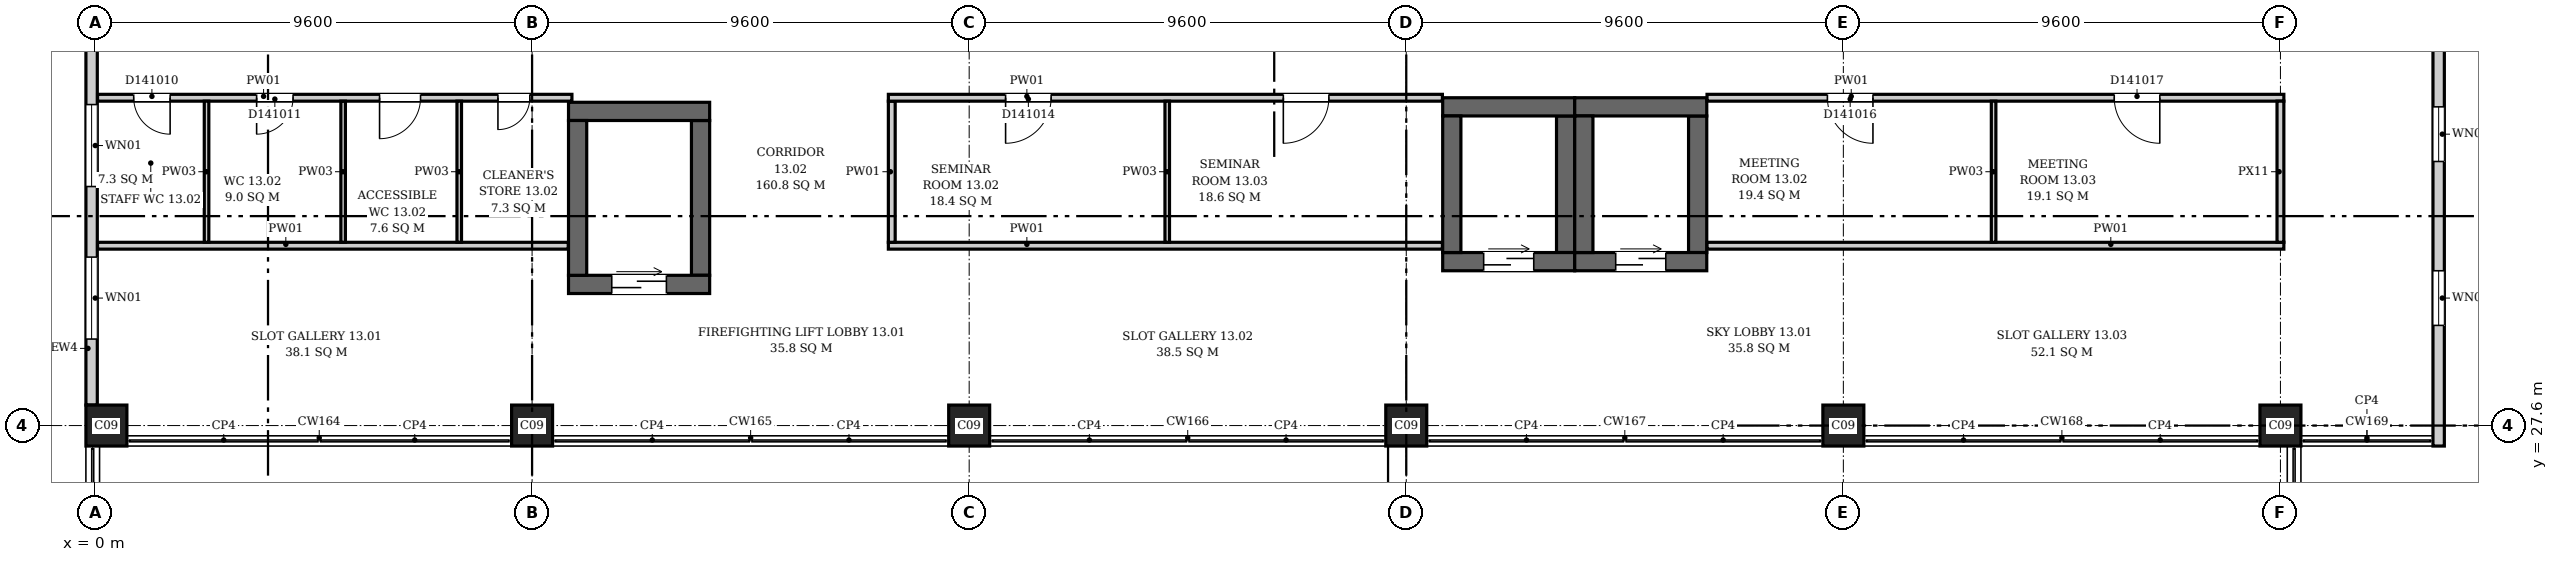
"""IFC4 building model, lengths in metres.
Left out: names, types, materials, properties, quantities, classifications, styles, units other than length and angle.
Written with IfcOpenShell. Run it as: python <this file> out.ifc"""

import sys

from ifc_helpers import new_model, si_unit, direction, frame, frame_2d, origin, origin_2d, place, context, subcontext, project, spatial, rectangle, extrude, element, fill, save


model = new_model("IFC4")
c1 = context("Model", 3, precision=1e-05, world=origin(), true_north=direction((0.0, 1.0)))
c2 = subcontext(c1, "Body", "Model", "MODEL_VIEW")
j1 = project(units=[si_unit("LENGTHUNIT", "METRE"), si_unit("PLANEANGLEUNIT", "RADIAN")], contexts=[c1])
p1 = place(None, origin())
s1 = spatial("IfcSite", under=j1, at=p1, CompositionType="ELEMENT")
p2 = place(p1, origin())
s2 = spatial("IfcBuilding", under=s1, at=p2, CompositionType="ELEMENT")
p3 = place(p2, frame((0.0, 0.0, 65.5)))
s3 = spatial("IfcBuildingStorey", under=s2, at=p3, CompositionType="ELEMENT", Elevation=65.5)
p4 = place(p3, frame((10.4, 30.7, 0.0), z_axis=(0.0, 0.0, 1.0), x_axis=(1.0, 0.0, 0.0)))
e1 = element("IfcWall", 1, at=p4, inside=s3, PredefinedType="SHEAR", context=c2, shape_type="SweptSolid", body=[
    extrude(rectangle(XDim=3.1, YDim=0.4, at=frame_2d((1.55, 0.0))), origin(), (0.0, 0.0, 1.0), 4.2),
])
p5 = place(p4, frame((0.95, 0.0, 0.0)))
e2 = element("IfcOpeningElement", 2, at=p5, cuts=e1, PredefinedType="OPENING", context=c2, shape_type="SweptSolid", body=[
    extrude(rectangle(XDim=1.2, YDim=2.1, at=frame_2d((0.6, 1.05))), frame((0.0, 0.21, 0.0), z_axis=(0.0, -1.0, 0.0), x_axis=(1.0, 0.0, 0.0)), (0.0, 0.0, 1.0), 0.42),
])
p6 = place(p3, frame((10.4, 34.5, 0.0), z_axis=(0.0, 0.0, 1.0), x_axis=(1.0, 0.0, 0.0)))
e3 = element("IfcWall", 3, at=p6, inside=s3, PredefinedType="SHEAR", context=c2, shape_type="SweptSolid", body=[
    extrude(rectangle(XDim=3.1, YDim=0.4, at=frame_2d((1.55, 0.0))), origin(), (0.0, 0.0, 1.0), 4.2),
])
for number, where, z_axis, x_axis in (
    (4, (10.6, 30.9, 0.0), (0.0, 0.0, 1.0), (0.0, 1.0, 0.0)),
    (5, (13.3, 30.9, 0.0), (0.0, 0.0, 1.0), (0.0, 1.0, 0.0)),
):
    element("IfcWall", number, at=place(p3, frame(where, z_axis=z_axis, x_axis=x_axis)), inside=s3, PredefinedType="SHEAR", context=c2, shape_type="SweptSolid", body=[
        extrude(rectangle(XDim=3.4, YDim=0.4, at=frame_2d((1.7, 0.0))), origin(), (0.0, 0.0, 1.0), 4.2),
    ])
p7 = place(p3, frame((29.6, 31.2, 0.0), z_axis=(0.0, 0.0, 1.0), x_axis=(1.0, 0.0, 0.0)))
e6 = element("IfcWall", 6, at=p7, inside=s3, PredefinedType="SHEAR", context=c2, shape_type="SweptSolid", body=[
    extrude(rectangle(XDim=2.9, YDim=0.4, at=frame_2d((1.45, 0.0))), origin(), (0.0, 0.0, 1.0), 4.2),
])
p8 = place(p7, frame((0.9, 0.0, 0.0)))
e7 = element("IfcOpeningElement", 7, at=p8, cuts=e6, PredefinedType="OPENING", context=c2, shape_type="SweptSolid", body=[
    extrude(rectangle(XDim=1.1, YDim=2.1, at=frame_2d((0.55, 1.05))), frame((0.0, 0.21, 0.0), z_axis=(0.0, -1.0, 0.0), x_axis=(1.0, 0.0, 0.0)), (0.0, 0.0, 1.0), 0.42),
])
p9 = place(p3, frame((29.6, 34.6, 0.0), z_axis=(0.0, 0.0, 1.0), x_axis=(1.0, 0.0, 0.0)))
e8 = element("IfcWall", 8, at=p9, inside=s3, PredefinedType="SHEAR", context=c2, shape_type="SweptSolid", body=[
    extrude(rectangle(XDim=2.9, YDim=0.4, at=frame_2d((1.45, 0.0))), origin(), (0.0, 0.0, 1.0), 4.2),
])
for number, where, z_axis, x_axis in (
    (9, (29.8, 31.4, 0.0), (0.0, 0.0, 1.0), (0.0, 1.0, 0.0)),
    (10, (32.3, 31.4, 0.0), (0.0, 0.0, 1.0), (0.0, 1.0, 0.0)),
):
    element("IfcWall", number, at=place(p3, frame(where, z_axis=z_axis, x_axis=x_axis)), inside=s3, PredefinedType="SHEAR", context=c2, shape_type="SweptSolid", body=[
        extrude(rectangle(XDim=3.0, YDim=0.4, at=frame_2d((1.5, 0.0))), origin(), (0.0, 0.0, 1.0), 4.2),
    ])
p10 = place(p3, frame((32.5, 31.2, 0.0), z_axis=(0.0, 0.0, 1.0), x_axis=(1.0, 0.0, 0.0)))
e11 = element("IfcWall", 11, at=p10, inside=s3, PredefinedType="SHEAR", context=c2, shape_type="SweptSolid", body=[
    extrude(rectangle(XDim=2.9, YDim=0.4, at=frame_2d((1.45, 0.0))), origin(), (0.0, 0.0, 1.0), 4.2),
])
p11 = place(p10, frame((0.9, 0.0, 0.0)))
e12 = element("IfcOpeningElement", 12, at=p11, cuts=e11, PredefinedType="OPENING", context=c2, shape_type="SweptSolid", body=[
    extrude(rectangle(XDim=1.1, YDim=2.1, at=frame_2d((0.55, 1.05))), frame((0.0, 0.21, 0.0), z_axis=(0.0, -1.0, 0.0), x_axis=(1.0, 0.0, 0.0)), (0.0, 0.0, 1.0), 0.42),
])
p12 = place(p3, frame((32.5, 34.6, 0.0), z_axis=(0.0, 0.0, 1.0), x_axis=(1.0, 0.0, 0.0)))
e13 = element("IfcWall", 13, at=p12, inside=s3, PredefinedType="SHEAR", context=c2, shape_type="SweptSolid", body=[
    extrude(rectangle(XDim=2.9, YDim=0.4, at=frame_2d((1.45, 0.0))), origin(), (0.0, 0.0, 1.0), 4.2),
])
for number, where, z_axis, x_axis in (
    (14, (32.7, 31.4, 0.0), (0.0, 0.0, 1.0), (0.0, 1.0, 0.0)),
    (15, (35.2, 31.4, 0.0), (0.0, 0.0, 1.0), (0.0, 1.0, 0.0)),
):
    element("IfcWall", number, at=place(p3, frame(where, z_axis=z_axis, x_axis=x_axis)), inside=s3, PredefinedType="SHEAR", context=c2, shape_type="SweptSolid", body=[
        extrude(rectangle(XDim=3.0, YDim=0.4, at=frame_2d((1.5, 0.0))), origin(), (0.0, 0.0, 1.0), 4.2),
    ])
for number, where, z_axis, x_axis in (
    (16, (0.25, 27.6, 0.0), (0.0, 0.0, 1.0), (1.0, 0.0, 0.0)),
    (17, (9.6, 27.6, 0.0), (0.0, 0.0, 1.0), (1.0, 0.0, 0.0)),
    (18, (19.2, 27.6, 0.0), (0.0, 0.0, 1.0), (1.0, 0.0, 0.0)),
    (19, (28.8, 27.6, 0.0), (0.0, 0.0, 1.0), (1.0, 0.0, 0.0)),
    (20, (38.4, 27.6, 0.0), (0.0, 0.0, 1.0), (1.0, 0.0, 0.0)),
    (21, (48.0, 27.6, 0.0), (0.0, 0.0, 1.0), (1.0, 0.0, 0.0)),
):
    element("IfcColumn", number, at=place(p3, frame(where, z_axis=z_axis, x_axis=x_axis)), inside=s3, PredefinedType="COLUMN", context=c2, shape_type="SweptSolid", body=[
        extrude(rectangle(XDim=0.9, YDim=0.9, at=origin_2d()), origin(), (0.0, 0.0, 1.0), 4.2),
    ])
p13 = place(p3, frame((-0.074, 36.35, 0.0), z_axis=(0.0, 0.0, 1.0), x_axis=(0.0, -1.0, 0.0)))
e22 = element("IfcWall", 22, at=p13, inside=s3, PredefinedType="ELEMENTEDWALL", context=c2, shape_type="SweptSolid", body=[
    extrude(rectangle(XDim=8.3, YDim=0.25, at=frame_2d((4.15, 0.0))), origin(), (0.0, 0.0, 1.0), 3.9),
])
p14 = place(p13, frame((5.05, 0.0, 0.9)))
e23 = element("IfcOpeningElement", 23, at=p14, cuts=e22, PredefinedType="OPENING", context=c2, shape_type="SweptSolid", body=[
    extrude(rectangle(XDim=1.8, YDim=2.6, at=frame_2d((0.9, 1.3))), frame((0.0, 0.135, 0.0), z_axis=(0.0, -1.0, 0.0), x_axis=(1.0, 0.0, 0.0)), (0.0, 0.0, 1.0), 0.27),
])
p15 = place(p13, frame((1.7, 0.0, 0.9)))
e24 = element("IfcOpeningElement", 24, at=p15, cuts=e22, PredefinedType="OPENING", context=c2, shape_type="SweptSolid", body=[
    extrude(rectangle(XDim=1.8, YDim=2.6, at=frame_2d((0.9, 1.3))), frame((0.0, 0.135, 0.0), z_axis=(0.0, -1.0, 0.0), x_axis=(1.0, 0.0, 0.0)), (0.0, 0.0, 1.0), 0.27),
])
p16 = place(p3, frame((51.475, 27.15, 0.0), z_axis=(0.0, 0.0, 1.0), x_axis=(0.0, 1.0, 0.0)))
e25 = element("IfcWall", 25, at=p16, inside=s3, PredefinedType="ELEMENTEDWALL", context=c2, shape_type="SweptSolid", body=[
    extrude(rectangle(XDim=19.3, YDim=0.25, at=frame_2d((9.65, 0.0))), origin(), (0.0, 0.0, 1.0), 3.9),
])
p17 = place(p16, frame((2.65, 0.0, 0.6)))
e26 = element("IfcOpeningElement", 26, at=p17, cuts=e25, PredefinedType="OPENING", context=c2, shape_type="SweptSolid", body=[
    extrude(rectangle(XDim=1.2, YDim=2.5, at=frame_2d((0.6, 1.25))), frame((0.0, 0.135, 0.0), z_axis=(0.0, -1.0, 0.0), x_axis=(1.0, 0.0, 0.0)), (0.0, 0.0, 1.0), 0.27),
])
p18 = place(p16, frame((6.25, 0.0, 0.6)))
e27 = element("IfcOpeningElement", 27, at=p18, cuts=e25, PredefinedType="OPENING", context=c2, shape_type="SweptSolid", body=[
    extrude(rectangle(XDim=1.2, YDim=2.5, at=frame_2d((0.6, 1.25))), frame((0.0, 0.135, 0.0), z_axis=(0.0, -1.0, 0.0), x_axis=(1.0, 0.0, 0.0)), (0.0, 0.0, 1.0), 0.27),
])
p19 = place(p16, frame((11.85, 0.0, 0.6)))
e28 = element("IfcOpeningElement", 28, at=p19, cuts=e25, PredefinedType="OPENING", context=c2, shape_type="SweptSolid", body=[
    extrude(rectangle(XDim=1.2, YDim=2.5, at=frame_2d((0.6, 1.25))), frame((0.0, 0.135, 0.0), z_axis=(0.0, -1.0, 0.0), x_axis=(1.0, 0.0, 0.0)), (0.0, 0.0, 1.0), 0.27),
])
p20 = place(p16, frame((15.45, 0.0, 0.6)))
e29 = element("IfcOpeningElement", 29, at=p20, cuts=e25, PredefinedType="OPENING", context=c2, shape_type="SweptSolid", body=[
    extrude(rectangle(XDim=1.2, YDim=2.5, at=frame_2d((0.6, 1.25))), frame((0.0, 0.135, 0.0), z_axis=(0.0, -1.0, 0.0), x_axis=(1.0, 0.0, 0.0)), (0.0, 0.0, 1.0), 0.27),
])
p21 = place(p3, frame((0.056, 31.55, 0.0), z_axis=(0.0, 0.0, 1.0), x_axis=(1.0, 0.0, 0.0)))
e30 = element("IfcWall", 30, at=p21, inside=s3, PredefinedType="PARTITIONING", context=c2, shape_type="SweptSolid", body=[
    extrude(rectangle(XDim=10.338, YDim=0.15, at=frame_2d((5.169, 0.0))), origin(), (0.0, 0.0, 1.0), 3.9),
])
p22 = place(p3, frame((0.056, 34.8, 0.0), z_axis=(0.0, 0.0, 1.0), x_axis=(1.0, 0.0, 0.0)))
e31 = element("IfcWall", 31, at=p22, inside=s3, PredefinedType="PARTITIONING", context=c2, shape_type="SweptSolid", body=[
    extrude(rectangle(XDim=10.419, YDim=0.15, at=frame_2d((5.209, 0.0))), origin(), (0.0, 0.0, 1.0), 3.9),
])
p23 = place(p22, frame((0.794, 0.0, 0.0)))
e32 = element("IfcOpeningElement", 32, at=p23, cuts=e31, PredefinedType="OPENING", context=c2, shape_type="SweptSolid", body=[
    extrude(rectangle(XDim=0.8, YDim=2.1, at=frame_2d((0.4, 1.05))), frame((0.0, 0.085, 0.0), z_axis=(0.0, -1.0, 0.0), x_axis=(1.0, 0.0, 0.0)), (0.0, 0.0, 1.0), 0.17),
])
p24 = place(p22, frame((3.494, 0.0, 0.0)))
e33 = element("IfcOpeningElement", 33, at=p24, cuts=e31, PredefinedType="OPENING", context=c2, shape_type="SweptSolid", body=[
    extrude(rectangle(XDim=0.8, YDim=2.1, at=frame_2d((0.4, 1.05))), frame((0.0, 0.085, 0.0), z_axis=(0.0, -1.0, 0.0), x_axis=(1.0, 0.0, 0.0)), (0.0, 0.0, 1.0), 0.17),
])
p25 = place(p22, frame((6.194, 0.0, 0.0)))
e34 = element("IfcOpeningElement", 34, at=p25, cuts=e31, PredefinedType="OPENING", context=c2, shape_type="SweptSolid", body=[
    extrude(rectangle(XDim=0.9, YDim=2.1, at=frame_2d((0.45, 1.05))), frame((0.0, 0.085, 0.0), z_axis=(0.0, -1.0, 0.0), x_axis=(1.0, 0.0, 0.0)), (0.0, 0.0, 1.0), 0.17),
])
p26 = place(p22, frame((8.794, 0.0, 0.0)))
e35 = element("IfcOpeningElement", 35, at=p26, cuts=e31, PredefinedType="OPENING", context=c2, shape_type="SweptSolid", body=[
    extrude(rectangle(XDim=0.7, YDim=2.1, at=frame_2d((0.35, 1.05))), frame((0.0, 0.085, 0.0), z_axis=(0.0, -1.0, 0.0), x_axis=(1.0, 0.0, 0.0)), (0.0, 0.0, 1.0), 0.17),
])
for number, where, z_axis, x_axis in (
    (36, (2.45, 31.625, 0.0), (0.0, 0.0, 1.0), (0.0, 1.0, 0.0)),
    (37, (5.45, 31.625, 0.0), (0.0, 0.0, 1.0), (0.0, 1.0, 0.0)),
    (38, (8.0, 31.625, 0.0), (0.0, 0.0, 1.0), (0.0, 1.0, 0.0)),
):
    element("IfcWall", number, at=place(p3, frame(where, z_axis=z_axis, x_axis=x_axis)), inside=s3, PredefinedType="PARTITIONING", context=c2, shape_type="SweptSolid", body=[
        extrude(rectangle(XDim=3.1, YDim=0.1, at=frame_2d((1.55, 0.0))), origin(), (0.0, 0.0, 1.0), 3.9),
    ])
p27 = place(p3, frame((17.425, 31.55, 0.0), z_axis=(0.0, 0.0, 1.0), x_axis=(1.0, 0.0, 0.0)))
e39 = element("IfcWall", 39, at=p27, inside=s3, PredefinedType="PARTITIONING", context=c2, shape_type="SweptSolid", body=[
    extrude(rectangle(XDim=12.169, YDim=0.15, at=frame_2d((6.084, 0.0))), origin(), (0.0, 0.0, 1.0), 3.9),
])
p28 = place(p3, frame((17.5, 31.625, 0.0), z_axis=(0.0, 0.0, 1.0), x_axis=(0.0, 1.0, 0.0)))
e40 = element("IfcWall", 40, at=p28, inside=s3, PredefinedType="PARTITIONING", context=c2, shape_type="SweptSolid", body=[
    extrude(rectangle(XDim=3.1, YDim=0.15, at=frame_2d((1.55, 0.0))), origin(), (0.0, 0.0, 1.0), 3.9),
])
p29 = place(p3, frame((17.425, 34.8, 0.0), z_axis=(0.0, 0.0, 1.0), x_axis=(1.0, 0.0, 0.0)))
e41 = element("IfcWall", 41, at=p29, inside=s3, PredefinedType="PARTITIONING", context=c2, shape_type="SweptSolid", body=[
    extrude(rectangle(XDim=12.169, YDim=0.15, at=frame_2d((6.084, 0.0))), origin(), (0.0, 0.0, 1.0), 3.9),
])
p30 = place(p29, frame((2.575, 0.0, 0.0)))
e42 = element("IfcOpeningElement", 42, at=p30, cuts=e41, PredefinedType="OPENING", context=c2, shape_type="SweptSolid", body=[
    extrude(rectangle(XDim=1.0, YDim=2.1, at=frame_2d((0.5, 1.05))), frame((0.0, 0.085, 0.0), z_axis=(0.0, -1.0, 0.0), x_axis=(1.0, 0.0, 0.0)), (0.0, 0.0, 1.0), 0.17),
])
p31 = place(p29, frame((8.675, 0.0, 0.0)))
e43 = element("IfcOpeningElement", 43, at=p31, cuts=e41, PredefinedType="OPENING", context=c2, shape_type="SweptSolid", body=[
    extrude(rectangle(XDim=1.0, YDim=2.1, at=frame_2d((0.5, 1.05))), frame((0.0, 0.085, 0.0), z_axis=(0.0, -1.0, 0.0), x_axis=(1.0, 0.0, 0.0)), (0.0, 0.0, 1.0), 0.17),
])
p32 = place(p3, frame((23.55, 31.625, 0.0), z_axis=(0.0, 0.0, 1.0), x_axis=(0.0, 1.0, 0.0)))
e44 = element("IfcWall", 44, at=p32, inside=s3, PredefinedType="PARTITIONING", context=c2, shape_type="SweptSolid", body=[
    extrude(rectangle(XDim=3.1, YDim=0.1, at=frame_2d((1.55, 0.0))), origin(), (0.0, 0.0, 1.0), 3.9),
])
p33 = place(p3, frame((35.406, 31.55, 0.0), z_axis=(0.0, 0.0, 1.0), x_axis=(1.0, 0.0, 0.0)))
e45 = element("IfcWall", 45, at=p33, inside=s3, PredefinedType="PARTITIONING", context=c2, shape_type="SweptSolid", body=[
    extrude(rectangle(XDim=12.669, YDim=0.15, at=frame_2d((6.334, 0.0))), origin(), (0.0, 0.0, 1.0), 3.9),
])
p34 = place(p3, frame((35.406, 34.8, 0.0), z_axis=(0.0, 0.0, 1.0), x_axis=(1.0, 0.0, 0.0)))
e46 = element("IfcWall", 46, at=p34, inside=s3, PredefinedType="PARTITIONING", context=c2, shape_type="SweptSolid", body=[
    extrude(rectangle(XDim=12.669, YDim=0.15, at=frame_2d((6.334, 0.0))), origin(), (0.0, 0.0, 1.0), 3.9),
])
p35 = place(p34, frame((2.644, 0.0, 0.0)))
e47 = element("IfcOpeningElement", 47, at=p35, cuts=e46, PredefinedType="OPENING", context=c2, shape_type="SweptSolid", body=[
    extrude(rectangle(XDim=1.0, YDim=2.1, at=frame_2d((0.5, 1.05))), frame((0.0, 0.085, 0.0), z_axis=(0.0, -1.0, 0.0), x_axis=(1.0, 0.0, 0.0)), (0.0, 0.0, 1.0), 0.17),
])
p36 = place(p34, frame((8.944, 0.0, 0.0)))
e48 = element("IfcOpeningElement", 48, at=p36, cuts=e46, PredefinedType="OPENING", context=c2, shape_type="SweptSolid", body=[
    extrude(rectangle(XDim=1.0, YDim=2.1, at=frame_2d((0.5, 1.05))), frame((0.0, 0.085, 0.0), z_axis=(0.0, -1.0, 0.0), x_axis=(1.0, 0.0, 0.0)), (0.0, 0.0, 1.0), 0.17),
])
p37 = place(p3, frame((41.7, 31.625, 0.0), z_axis=(0.0, 0.0, 1.0), x_axis=(0.0, 1.0, 0.0)))
e49 = element("IfcWall", 49, at=p37, inside=s3, PredefinedType="PARTITIONING", context=c2, shape_type="SweptSolid", body=[
    extrude(rectangle(XDim=3.1, YDim=0.1, at=frame_2d((1.55, 0.0))), origin(), (0.0, 0.0, 1.0), 3.9),
])
p38 = place(p3, frame((48.0, 31.625, 0.0), z_axis=(0.0, 0.0, 1.0), x_axis=(0.0, 1.0, 0.0)))
e50 = element("IfcWall", 50, at=p38, inside=s3, PredefinedType="PARTITIONING", context=c2, shape_type="SweptSolid", body=[
    extrude(rectangle(XDim=3.1, YDim=0.15, at=frame_2d((1.55, 0.0))), origin(), (0.0, 0.0, 1.0), 3.3),
])
p39 = place(p14, origin())
e51 = element("IfcWindow", 51, at=p39, inside=s3, PartitioningType="SINGLE_PANEL", PredefinedType="WINDOW", context=c2, shape_type="SweptSolid", body=[
    extrude(rectangle(XDim=1.8, YDim=2.6, at=frame_2d((0.9, 1.3))), frame((0.0, 0.03, 0.0), z_axis=(0.0, -1.0, 0.0), x_axis=(1.0, 0.0, 0.0)), (0.0, 0.0, 1.0), 0.06),
])
fill(e23, e51)
p40 = place(p15, origin())
e52 = element("IfcWindow", 52, at=p40, inside=s3, PartitioningType="SINGLE_PANEL", PredefinedType="WINDOW", context=c2, shape_type="SweptSolid", body=[
    extrude(rectangle(XDim=1.8, YDim=2.6, at=frame_2d((0.9, 1.3))), frame((0.0, 0.03, 0.0), z_axis=(0.0, -1.0, 0.0), x_axis=(1.0, 0.0, 0.0)), (0.0, 0.0, 1.0), 0.06),
])
fill(e24, e52)
p41 = place(p17, origin())
e53 = element("IfcWindow", 53, at=p41, inside=s3, PartitioningType="SINGLE_PANEL", PredefinedType="WINDOW", context=c2, shape_type="SweptSolid", body=[
    extrude(rectangle(XDim=1.2, YDim=2.5, at=frame_2d((0.6, 1.25))), frame((0.0, 0.03, 0.0), z_axis=(0.0, -1.0, 0.0), x_axis=(1.0, 0.0, 0.0)), (0.0, 0.0, 1.0), 0.06),
])
fill(e26, e53)
p42 = place(p18, origin())
e54 = element("IfcWindow", 54, at=p42, inside=s3, PartitioningType="SINGLE_PANEL", PredefinedType="WINDOW", context=c2, shape_type="SweptSolid", body=[
    extrude(rectangle(XDim=1.2, YDim=2.5, at=frame_2d((0.6, 1.25))), frame((0.0, 0.03, 0.0), z_axis=(0.0, -1.0, 0.0), x_axis=(1.0, 0.0, 0.0)), (0.0, 0.0, 1.0), 0.06),
])
fill(e27, e54)
p43 = place(p5, origin())
e55 = element("IfcDoor", 55, at=p43, inside=s3, OperationType="DOUBLE_DOOR_SLIDING", PredefinedType="DOOR", context=c2, shape_type="SweptSolid", body=[
    extrude(rectangle(XDim=1.2, YDim=2.1, at=frame_2d((0.6, 1.05))), frame((0.0, 0.025, 0.0), z_axis=(0.0, -1.0, 0.0), x_axis=(1.0, 0.0, 0.0)), (0.0, 0.0, 1.0), 0.05),
])
fill(e2, e55)
p44 = place(p8, origin())
e56 = element("IfcDoor", 56, at=p44, inside=s3, OperationType="DOUBLE_DOOR_SLIDING", PredefinedType="DOOR", context=c2, shape_type="SweptSolid", body=[
    extrude(rectangle(XDim=1.1, YDim=2.1, at=frame_2d((0.55, 1.05))), frame((0.0, 0.025, 0.0), z_axis=(0.0, -1.0, 0.0), x_axis=(1.0, 0.0, 0.0)), (0.0, 0.0, 1.0), 0.05),
])
fill(e7, e56)
p45 = place(p11, origin())
e57 = element("IfcDoor", 57, at=p45, inside=s3, OperationType="DOUBLE_DOOR_SLIDING", PredefinedType="DOOR", context=c2, shape_type="SweptSolid", body=[
    extrude(rectangle(XDim=1.1, YDim=2.1, at=frame_2d((0.55, 1.05))), frame((0.0, 0.025, 0.0), z_axis=(0.0, -1.0, 0.0), x_axis=(1.0, 0.0, 0.0)), (0.0, 0.0, 1.0), 0.05),
])
fill(e12, e57)
p46 = place(p23, origin())
e58 = element("IfcDoor", 58, at=p46, inside=s3, OperationType="SINGLE_SWING_RIGHT", PredefinedType="DOOR", context=c2, shape_type="SweptSolid", body=[
    extrude(rectangle(XDim=0.8, YDim=2.1, at=frame_2d((0.4, 1.05))), frame((0.0, 0.025, 0.0), z_axis=(0.0, -1.0, 0.0), x_axis=(1.0, 0.0, 0.0)), (0.0, 0.0, 1.0), 0.05),
])
fill(e32, e58)
p47 = place(p24, origin())
e59 = element("IfcDoor", 59, at=p47, inside=s3, OperationType="SINGLE_SWING_LEFT", PredefinedType="DOOR", context=c2, shape_type="SweptSolid", body=[
    extrude(rectangle(XDim=0.8, YDim=2.1, at=frame_2d((0.4, 1.05))), frame((0.0, 0.025, 0.0), z_axis=(0.0, -1.0, 0.0), x_axis=(1.0, 0.0, 0.0)), (0.0, 0.0, 1.0), 0.05),
])
fill(e33, e59)
p48 = place(p25, origin())
e60 = element("IfcDoor", 60, at=p48, inside=s3, OperationType="SINGLE_SWING_LEFT", PredefinedType="DOOR", context=c2, shape_type="SweptSolid", body=[
    extrude(rectangle(XDim=0.9, YDim=2.1, at=frame_2d((0.45, 1.05))), frame((0.0, 0.025, 0.0), z_axis=(0.0, -1.0, 0.0), x_axis=(1.0, 0.0, 0.0)), (0.0, 0.0, 1.0), 0.05),
])
fill(e34, e60)
p49 = place(p26, origin())
e61 = element("IfcDoor", 61, at=p49, inside=s3, OperationType="SINGLE_SWING_LEFT", PredefinedType="DOOR", context=c2, shape_type="SweptSolid", body=[
    extrude(rectangle(XDim=0.7, YDim=2.1, at=frame_2d((0.35, 1.05))), frame((0.0, 0.025, 0.0), z_axis=(0.0, -1.0, 0.0), x_axis=(1.0, 0.0, 0.0)), (0.0, 0.0, 1.0), 0.05),
])
fill(e35, e61)
p50 = place(p30, origin())
e62 = element("IfcDoor", 62, at=p50, inside=s3, OperationType="SINGLE_SWING_LEFT", PredefinedType="DOOR", context=c2, shape_type="SweptSolid", body=[
    extrude(rectangle(XDim=1.0, YDim=2.1, at=frame_2d((0.5, 1.05))), frame((0.0, 0.025, 0.0), z_axis=(0.0, -1.0, 0.0), x_axis=(1.0, 0.0, 0.0)), (0.0, 0.0, 1.0), 0.05),
])
fill(e42, e62)
p51 = place(p31, origin())
e63 = element("IfcDoor", 63, at=p51, inside=s3, OperationType="SINGLE_SWING_LEFT", PredefinedType="DOOR", context=c2, shape_type="SweptSolid", body=[
    extrude(rectangle(XDim=1.0, YDim=2.1, at=frame_2d((0.5, 1.05))), frame((0.0, 0.025, 0.0), z_axis=(0.0, -1.0, 0.0), x_axis=(1.0, 0.0, 0.0)), (0.0, 0.0, 1.0), 0.05),
])
fill(e43, e63)
p52 = place(p35, origin())
e64 = element("IfcDoor", 64, at=p52, inside=s3, OperationType="SINGLE_SWING_RIGHT", PredefinedType="DOOR", context=c2, shape_type="SweptSolid", body=[
    extrude(rectangle(XDim=1.0, YDim=2.1, at=frame_2d((0.5, 1.05))), frame((0.0, 0.025, 0.0), z_axis=(0.0, -1.0, 0.0), x_axis=(1.0, 0.0, 0.0)), (0.0, 0.0, 1.0), 0.05),
])
fill(e47, e64)
p53 = place(p36, origin())
e65 = element("IfcDoor", 65, at=p53, inside=s3, OperationType="SINGLE_SWING_RIGHT", PredefinedType="DOOR", context=c2, shape_type="SweptSolid", body=[
    extrude(rectangle(XDim=1.0, YDim=2.1, at=frame_2d((0.5, 1.05))), frame((0.0, 0.025, 0.0), z_axis=(0.0, -1.0, 0.0), x_axis=(1.0, 0.0, 0.0)), (0.0, 0.0, 1.0), 0.05),
])
fill(e48, e65)
save(model, sys.argv[1])
